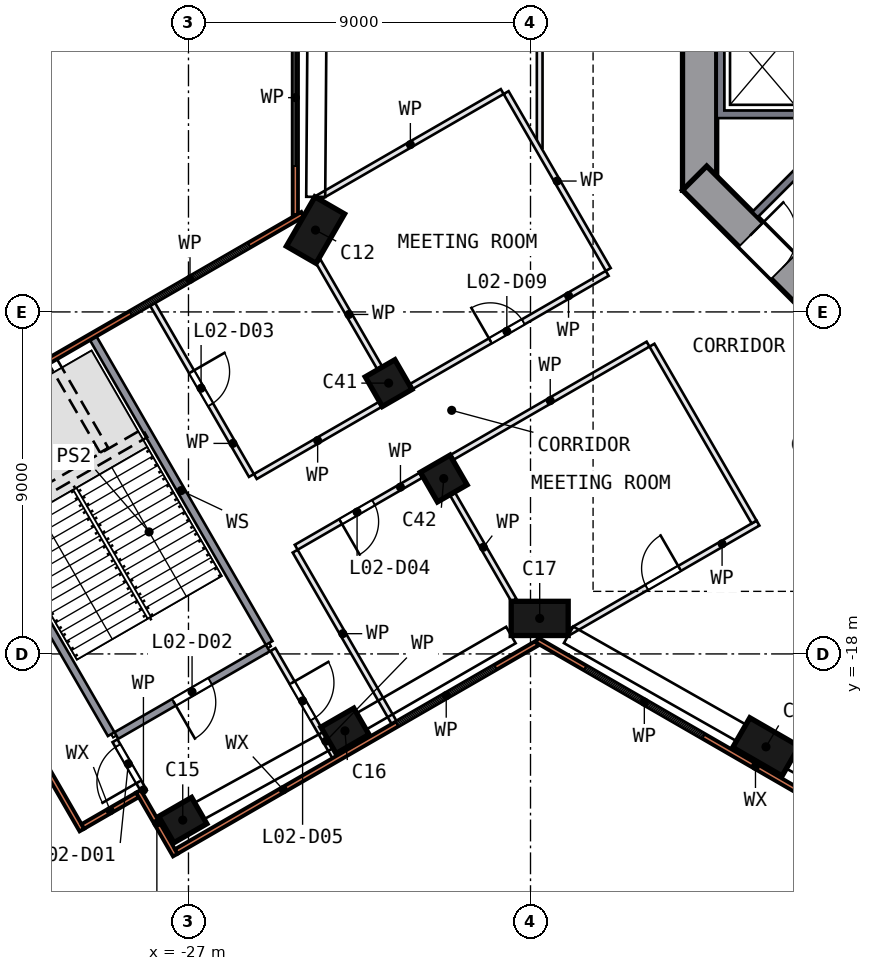
"""IFC4 building model, lengths in metres.
Left out: names, types, materials, properties, quantities, classifications, styles, units other than length and angle.
Written with IfcOpenShell. Run it as: python <this file> out.ifc"""

import sys

from ifc_helpers import new_model, si_unit, direction, frame, frame_2d, origin, origin_2d, place, context, subcontext, project, spatial, polyline, rectangle, outline, extrude, element, fill, save


model = new_model("IFC4")
c1 = context("Model", 3, precision=1e-05, world=origin(), true_north=direction((0.0, 1.0)))
c2 = subcontext(c1, "Body", "Model", "MODEL_VIEW")
j1 = project(units=[si_unit("LENGTHUNIT", "METRE"), si_unit("PLANEANGLEUNIT", "RADIAN")], contexts=[c1])
p1 = place(None, origin())
s1 = spatial("IfcSite", under=j1, at=p1, CompositionType="ELEMENT")
p2 = place(p1, origin())
s2 = spatial("IfcBuilding", under=s1, at=p2, CompositionType="ELEMENT")
p3 = place(p2, frame((0.0, 0.0, 14.0)))
s3 = spatial("IfcBuildingStorey", under=s2, at=p3, CompositionType="ELEMENT", Elevation=14.0)
p4 = place(p3, frame((-23.658, -6.846, 0.0), z_axis=(0.0, 0.0, 1.0), x_axis=(0.5, 0.866025404, 0.0)))
e1 = element("IfcColumn", 1, at=p4, inside=s3, PredefinedType="COLUMN", context=c2, shape_type="SweptSolid", body=[
    extrude(rectangle(XDim=1.5, YDim=0.9, at=origin_2d()), origin(), (0.0, 0.0, 1.0), 4.55),
])
for number, where, z_axis, x_axis in (
    (2, (-27.151, -22.373, 0.0), (0.0, 0.0, 1.0), (0.866, 0.5, 0.0)),
    (3, (-22.883, -20.024, 0.0), (0.0, 0.0, 1.0), (0.866, 0.5, 0.0)),
):
    element("IfcColumn", number, at=place(p3, frame(where, z_axis=z_axis, x_axis=x_axis)), inside=s3, PredefinedType="COLUMN", context=c2, shape_type="SweptSolid", body=[
        extrude(rectangle(XDim=1.0, YDim=0.8, at=origin_2d()), origin(), (0.0, 0.0, 1.0), 4.55),
    ])
for number, where, z_axis, x_axis in (
    (4, (-17.758, -17.065, 0.0), (0.0, 0.0, 1.0), (-1.0, 0.0, 0.0)),
    (5, (-11.804, -20.445, 0.0), (0.0, 0.0, 1.0), (0.866, -0.5, 0.0)),
):
    element("IfcColumn", number, at=place(p3, frame(where, z_axis=z_axis, x_axis=x_axis)), inside=s3, PredefinedType="COLUMN", context=c2, shape_type="SweptSolid", body=[
        extrude(rectangle(XDim=1.5, YDim=0.9, at=origin_2d()), origin(), (0.0, 0.0, 1.0), 4.55),
    ])
for number, where, z_axis, x_axis in (
    (6, (-21.733, -10.873, 0.0), (0.0, 0.0, 1.0), (-0.866, -0.5, 0.0)),
    (7, (-20.283, -13.385, 0.0), (0.0, 0.0, 1.0), (-0.866, -0.5, 0.0)),
):
    element("IfcColumn", number, at=place(p3, frame(where, z_axis=z_axis, x_axis=x_axis)), inside=s3, PredefinedType="COLUMN", context=c2, shape_type="SweptSolid", body=[
        extrude(rectangle(XDim=0.9, YDim=0.9, at=origin_2d()), origin(), (0.0, 0.0, 1.0), 4.55),
    ])
p5 = place(p3, frame((-13.55, 5.799, 0.0), z_axis=(0.0, 0.0, 1.0), x_axis=(0.0, -1.0, 0.0)))
e8 = element("IfcWall", 8, at=p5, inside=s3, PredefinedType="SHEAR", context=c2, shape_type="SweptSolid", body=[
    extrude(rectangle(XDim=11.598, YDim=0.9, at=frame_2d((5.799, 0.0))), origin(), (0.0, 0.0, 1.0), 5.0),
])
p6 = place(p5, frame((4.899, 0.0, 0.0)))
e9 = element("IfcOpeningElement", 9, at=p6, cuts=e8, PredefinedType="OPENING", context=c2, shape_type="SweptSolid", body=[
    extrude(rectangle(XDim=1.8, YDim=2.1, at=frame_2d((0.9, 1.05))), frame((0.0, 0.46, 0.0), z_axis=(0.0, -1.0, 0.0), x_axis=(1.0, 0.0, 0.0)), (0.0, 0.0, 1.0), 0.92),
])
p7 = place(p3, frame((-13.682, -5.481, 0.0), z_axis=(0.0, 0.0, 1.0), x_axis=(0.707106781, -0.707106781, 0.0)))
e10 = element("IfcWall", 10, at=p7, inside=s3, PredefinedType="SHEAR", context=c2, shape_type="SweptSolid", body=[
    extrude(rectangle(XDim=11.598, YDim=0.9, at=frame_2d((5.799, 0.0))), origin(), (0.0, 0.0, 1.0), 5.0),
])
p8 = place(p7, frame((2.099, 0.0, 0.0)))
e11 = element("IfcOpeningElement", 11, at=p8, cuts=e10, PredefinedType="OPENING", context=c2, shape_type="SweptSolid", body=[
    extrude(rectangle(XDim=1.2, YDim=2.1, at=frame_2d((0.6, 1.05))), frame((0.0, 0.46, 0.0), z_axis=(0.0, -1.0, 0.0), x_axis=(1.0, 0.0, 0.0)), (0.0, 0.0, 1.0), 0.92),
])
p9 = place(p3, frame((-24.188, 6.341, 0.0), z_axis=(0.0, 0.0, 1.0), x_axis=(0.0, -1.0, 0.0)))
e12 = element("IfcWall", 12, at=p9, inside=s3, PredefinedType="SOLIDWALL", context=c2, shape_type="SweptSolid", body=[
    extrude(rectangle(XDim=12.801, YDim=0.14, at=frame_2d((6.4, 0.0))), origin(), (0.0, 0.0, 1.0), 4.55),
])
p10 = place(p9, frame((1.748, 0.0, 0.9)))
e13 = element("IfcOpeningElement", 13, at=p10, cuts=e12, PredefinedType="OPENING", context=c2, shape_type="SweptSolid", body=[
    extrude(rectangle(XDim=3.0, YDim=2.7, at=frame_2d((1.5, 1.35))), frame((0.0, 0.08, 0.0), z_axis=(0.0, -1.0, 0.0), x_axis=(1.0, 0.0, 0.0)), (0.0, 0.0, 1.0), 0.16),
])
p11 = place(p9, frame((7.902, 0.0, 0.9)))
e14 = element("IfcOpeningElement", 14, at=p11, cuts=e12, PredefinedType="OPENING", context=c2, shape_type="SweptSolid", body=[
    extrude(rectangle(XDim=3.6, YDim=2.7, at=frame_2d((1.8, 1.35))), frame((0.0, 0.08, 0.0), z_axis=(0.0, -1.0, 0.0), x_axis=(1.0, 0.0, 0.0)), (0.0, 0.0, 1.0), 0.16),
])
p12 = place(p3, frame((-23.995, -6.429, 0.0), z_axis=(0.0, 0.0, 1.0), x_axis=(-0.866018753, -0.500011519, 0.0)))
e15 = element("IfcWall", 15, at=p12, inside=s3, PredefinedType="SOLIDWALL", context=c2, shape_type="SweptSolid", body=[
    extrude(rectangle(XDim=11.405, YDim=0.14, at=frame_2d((5.703, 0.0))), origin(), (0.0, 0.0, 1.0), 4.55),
])
p13 = place(p12, frame((1.623, 0.0, 0.9)))
e16 = element("IfcOpeningElement", 16, at=p13, cuts=e15, PredefinedType="OPENING", context=c2, shape_type="SweptSolid", body=[
    extrude(rectangle(XDim=3.6, YDim=2.7, at=frame_2d((1.8, 1.35))), frame((0.0, 0.08, 0.0), z_axis=(0.0, -1.0, 0.0), x_axis=(1.0, 0.0, 0.0)), (0.0, 0.0, 1.0), 0.16),
])
p14 = place(p3, frame((-30.775, -20.955, 0.0), z_axis=(0.0, 0.0, 1.0), x_axis=(0.499969368, -0.866043088, 0.0)))
e17 = element("IfcWall", 17, at=p14, inside=s3, PredefinedType="SOLIDWALL", context=c2, shape_type="SweptSolid", body=[
    extrude(rectangle(XDim=1.94, YDim=0.14, at=frame_2d((0.97, 0.0))), origin(), (0.0, 0.0, 1.0), 4.55),
])
p15 = place(p3, frame((-29.78, -22.54, 0.0), z_axis=(0.0, 0.0, 1.0), x_axis=(0.865989634, 0.500061949, 0.0)))
e18 = element("IfcWall", 18, at=p15, inside=s3, PredefinedType="SOLIDWALL", context=c2, shape_type="SweptSolid", body=[
    extrude(rectangle(XDim=1.66, YDim=0.14, at=frame_2d((0.83, 0.0))), origin(), (0.0, 0.0, 1.0), 4.55),
])
p16 = place(p3, frame((-28.317, -21.614, 0.0), z_axis=(0.0, 0.0, 1.0), x_axis=(0.499969368, -0.866043088, 0.0)))
e19 = element("IfcWall", 19, at=p16, inside=s3, PredefinedType="SOLIDWALL", context=c2, shape_type="SweptSolid", body=[
    extrude(rectangle(XDim=1.94, YDim=0.14, at=frame_2d((0.97, 0.0))), origin(), (0.0, 0.0, 1.0), 4.55),
])
p17 = place(p3, frame((-27.321, -23.198, 0.0), z_axis=(0.0, 0.0, 1.0), x_axis=(0.866030546, 0.499991093, 0.0)))
e20 = element("IfcWall", 20, at=p17, inside=s3, PredefinedType="SOLIDWALL", context=c2, shape_type="SweptSolid", body=[
    extrude(rectangle(XDim=10.961, YDim=0.14, at=frame_2d((5.48, 0.0))), origin(), (0.0, 0.0, 1.0), 4.55),
])
p18 = place(p17, frame((6.702, 0.0, 0.9)))
e21 = element("IfcOpeningElement", 21, at=p18, cuts=e20, PredefinedType="OPENING", context=c2, shape_type="SweptSolid", body=[
    extrude(rectangle(XDim=3.0, YDim=2.7, at=frame_2d((1.5, 1.35))), frame((0.0, 0.08, 0.0), z_axis=(0.0, -1.0, 0.0), x_axis=(1.0, 0.0, 0.0)), (0.0, 0.0, 1.0), 0.16),
])
p19 = place(p3, frame((-17.828, -17.637, 0.0), z_axis=(0.0, 0.0, 1.0), x_axis=(0.866029009, -0.499993756, 0.0)))
e22 = element("IfcWall", 22, at=p19, inside=s3, PredefinedType="SOLIDWALL", context=c2, shape_type="SweptSolid", body=[
    extrude(rectangle(XDim=13.242, YDim=0.14, at=frame_2d((6.621, 0.0))), origin(), (0.0, 0.0, 1.0), 4.55),
])
p20 = place(p19, frame((1.46, 0.0, 0.9)))
e23 = element("IfcOpeningElement", 23, at=p20, cuts=e22, PredefinedType="OPENING", context=c2, shape_type="SweptSolid", body=[
    extrude(rectangle(XDim=3.6, YDim=2.7, at=frame_2d((1.8, 1.35))), frame((0.0, 0.08, 0.0), z_axis=(0.0, -1.0, 0.0), x_axis=(1.0, 0.0, 0.0)), (0.0, 0.0, 1.0), 0.16),
])
p21 = place(p19, frame((8.215, 0.0, 0.9)))
e24 = element("IfcOpeningElement", 24, at=p21, cuts=e22, PredefinedType="OPENING", context=c2, shape_type="SweptSolid", body=[
    extrude(rectangle(XDim=3.0, YDim=2.7, at=frame_2d((1.5, 1.35))), frame((0.0, 0.08, 0.0), z_axis=(0.0, -1.0, 0.0), x_axis=(1.0, 0.0, 0.0)), (0.0, 0.0, 1.0), 0.16),
])
p22 = place(p3, origin())
e25 = element("IfcWall", 25, at=p22, inside=s3, PredefinedType="SOLIDWALL", context=c2, shape_type="SweptSolid", body=[
    extrude(outline(polyline([(-13.1, -3.9), (-13.1, -1.2), (-10.9, -1.2), (-10.9, -1.4), (-12.9, -1.4), (-12.9, -3.7), (-10.9, -3.7), (-10.9, -3.9), (-13.1, -3.9)])), origin(), (0.0, 0.0, 1.0), 4.55),
])
p23 = place(p3, frame((-9.334, -3.677, 0.0), z_axis=(0.0, 0.0, 1.0), x_axis=(-0.707106781, -0.707106781, 0.0)))
e26 = element("IfcWall", 26, at=p23, inside=s3, PredefinedType="SOLIDWALL", context=c2, shape_type="SweptSolid", body=[
    extrude(rectangle(XDim=3.9, YDim=0.2, at=frame_2d((1.95, 0.0))), origin(), (0.0, 0.0, 1.0), 4.55),
])
p24 = place(p3, frame((-32.807, -13.577, 0.0), z_axis=(0.0, 0.0, 1.0), x_axis=(0.50000534, -0.866022321, 0.0)))
e27 = element("IfcWall", 27, at=p24, inside=s3, PredefinedType="SOLIDWALL", context=c2, shape_type="SweptSolid", body=[
    extrude(rectangle(XDim=7.545, YDim=0.2, at=frame_2d((3.773, 0.0))), origin(), (0.0, 0.0, 1.0), 4.55),
])
p25 = place(p3, frame((-28.162, -21.623, 0.0), z_axis=(0.0, 0.0, 1.0), x_axis=(-0.499877454, 0.866096144, 0.0)))
e28 = element("IfcWall", 28, at=p25, inside=s3, PredefinedType="PARTITIONING", context=c2, shape_type="SweptSolid", body=[
    extrude(rectangle(XDim=1.545, YDim=0.15, at=frame_2d((0.773, 0.0))), origin(), (0.0, 0.0, 1.0), 4.55),
])
p26 = place(p25, frame((0.295, 0.0, 0.0)))
e29 = element("IfcOpeningElement", 29, at=p26, cuts=e28, PredefinedType="OPENING", context=c2, shape_type="SweptSolid", body=[
    extrude(rectangle(XDim=1.1, YDim=2.1, at=frame_2d((0.55, 1.05))), frame((0.0, 0.085, 0.0), z_axis=(0.0, -1.0, 0.0), x_axis=(1.0, 0.0, 0.0)), (0.0, 0.0, 1.0), 0.17),
])
p27 = place(p3, frame((-24.914, -17.848, 0.0), z_axis=(0.0, 0.0, 1.0), x_axis=(-0.86601677, -0.500014953, 0.0)))
e30 = element("IfcWall", 30, at=p27, inside=s3, PredefinedType="SOLIDWALL", context=c2, shape_type="SweptSolid", body=[
    extrude(rectangle(XDim=4.6, YDim=0.2, at=frame_2d((2.3, 0.0))), origin(), (0.0, 0.0, 1.0), 4.55),
])
p28 = place(p27, frame((1.75, 0.0, 0.0)))
e31 = element("IfcOpeningElement", 31, at=p28, cuts=e30, PredefinedType="OPENING", context=c2, shape_type="SweptSolid", body=[
    extrude(rectangle(XDim=1.1, YDim=2.1, at=frame_2d((0.55, 1.05))), frame((0.0, 0.11, 0.0), z_axis=(0.0, -1.0, 0.0), x_axis=(1.0, 0.0, 0.0)), (0.0, 0.0, 1.0), 0.22),
])
p29 = place(p3, frame((-27.948, -8.792, 0.0), z_axis=(0.0, 0.0, 1.0), x_axis=(0.499979347, -0.866037328, 0.0)))
e32 = element("IfcWall", 32, at=p29, inside=s3, PredefinedType="PARTITIONING", context=c2, shape_type="SweptSolid", body=[
    extrude(rectangle(XDim=5.21, YDim=0.15, at=frame_2d((2.605, 0.0))), origin(), (0.0, 0.0, 1.0), 4.55),
])
p30 = place(p29, frame((2.06, 0.0, 0.0)))
e33 = element("IfcOpeningElement", 33, at=p30, cuts=e32, PredefinedType="OPENING", context=c2, shape_type="SweptSolid", body=[
    extrude(rectangle(XDim=1.0, YDim=2.1, at=frame_2d((0.5, 1.05))), frame((0.0, 0.085, 0.0), z_axis=(0.0, -1.0, 0.0), x_axis=(1.0, 0.0, 0.0)), (0.0, 0.0, 1.0), 0.17),
])
p31 = place(p3, frame((-24.877, -17.712, 0.0), z_axis=(0.0, 0.0, 1.0), x_axis=(-0.499984148, 0.866034555, 0.0)))
e34 = element("IfcWall", 34, at=p31, inside=s3, PredefinedType="SOLIDWALL", context=c2, shape_type="SweptSolid", body=[
    extrude(rectangle(XDim=9.26, YDim=0.2, at=frame_2d((4.63, 0.0))), origin(), (0.0, 0.0, 1.0), 4.55),
])
p32 = place(p3, frame((-23.582, -7.675, 0.0), z_axis=(0.0, 0.0, 1.0), x_axis=(0.500027049, -0.866009787, 0.0)))
e35 = element("IfcWall", 35, at=p32, inside=s3, PredefinedType="PARTITIONING", context=c2, shape_type="SweptSolid", body=[
    extrude(rectangle(XDim=3.215, YDim=0.15, at=frame_2d((1.607, 0.0))), origin(), (0.0, 0.0, 1.0), 4.55),
])
p33 = place(p3, frame((-20.886, -13.3, 0.0), z_axis=(0.0, 0.0, 1.0), x_axis=(-0.866012734, -0.500021944, 0.0)))
e36 = element("IfcWall", 36, at=p33, inside=s3, PredefinedType="PARTITIONING", context=c2, shape_type="SweptSolid", body=[
    extrude(rectangle(XDim=3.787, YDim=0.15, at=frame_2d((1.894, 0.0))), origin(), (0.0, 0.0, 1.0), 4.55),
])
p34 = place(p33, frame((1.437, 0.0, 0.0)))
e37 = element("IfcOpeningElement", 37, at=p34, cuts=e36, PredefinedType="OPENING", context=c2, shape_type="SweptSolid", body=[
    extrude(rectangle(XDim=1.0, YDim=2.1, at=frame_2d((0.5, 1.05))), frame((0.0, 0.085, 0.0), z_axis=(0.0, -1.0, 0.0), x_axis=(1.0, 0.0, 0.0)), (0.0, 0.0, 1.0), 0.17),
])
p35 = place(p3, frame((-20.055, -12.82, 0.0), z_axis=(0.0, 0.0, 1.0), x_axis=(0.866038559, 0.499977214, 0.0)))
e38 = element("IfcWall", 38, at=p35, inside=s3, PredefinedType="PARTITIONING", context=c2, shape_type="SweptSolid", body=[
    extrude(rectangle(XDim=5.945, YDim=0.15, at=frame_2d((2.973, 0.0))), origin(), (0.0, 0.0, 1.0), 4.55),
])
p36 = place(p3, frame((-24.777, -17.885, 0.0), z_axis=(0.0, 0.0, 1.0), x_axis=(0.499996863, -0.866027215, 0.0)))
e39 = element("IfcWall", 39, at=p36, inside=s3, PredefinedType="PARTITIONING", context=c2, shape_type="SweptSolid", body=[
    extrude(rectangle(XDim=3.26, YDim=0.15, at=frame_2d((1.63, 0.0))), origin(), (0.0, 0.0, 1.0), 4.55),
])
p37 = place(p36, frame((1.01, 0.0, 0.0)))
e40 = element("IfcOpeningElement", 40, at=p37, cuts=e39, PredefinedType="OPENING", context=c2, shape_type="SweptSolid", body=[
    extrude(rectangle(XDim=1.1, YDim=2.1, at=frame_2d((0.55, 1.05))), frame((0.0, 0.085, 0.0), z_axis=(0.0, -1.0, 0.0), x_axis=(1.0, 0.0, 0.0)), (0.0, 0.0, 1.0), 0.17),
])
p38 = place(p3, frame((-21.588, -19.808, 0.0), z_axis=(0.0, 0.0, 1.0), x_axis=(-0.499999637, 0.866025613, 0.0)))
e41 = element("IfcWall", 41, at=p38, inside=s3, PredefinedType="PARTITIONING", context=c2, shape_type="SweptSolid", body=[
    extrude(rectangle(XDim=5.21, YDim=0.15, at=frame_2d((2.605, 0.0))), origin(), (0.0, 0.0, 1.0), 4.55),
])
p39 = place(p3, frame((-20.045, -13.802, 0.0), z_axis=(0.0, 0.0, 1.0), x_axis=(0.500027049, -0.866009787, 0.0)))
e42 = element("IfcWall", 42, at=p39, inside=s3, PredefinedType="PARTITIONING", context=c2, shape_type="SweptSolid", body=[
    extrude(rectangle(XDim=3.215, YDim=0.15, at=frame_2d((1.607, 0.0))), origin(), (0.0, 0.0, 1.0), 4.55),
])
p40 = place(p3, frame((-18.744, -3.201, 0.0), z_axis=(0.0, 0.0, 1.0), x_axis=(-0.866027538, -0.499996304, 0.0)))
e43 = element("IfcWall", 43, at=p40, inside=s3, PredefinedType="PARTITIONING", context=c2, shape_type="SweptSolid", body=[
    extrude(rectangle(XDim=5.582, YDim=0.15, at=frame_2d((2.791, 0.0))), origin(), (0.0, 0.0, 1.0), 4.55),
])
p41 = place(p3, frame((-17.758, -4.683, 0.0), z_axis=(0.0, 0.0, 1.0), x_axis=(0.0, 1.0, 0.0)))
e44 = element("IfcWall", 44, at=p41, inside=s3, PredefinedType="PARTITIONING", context=c2, shape_type="SweptSolid", body=[
    extrude(rectangle(XDim=9.367, YDim=0.15, at=frame_2d((4.683, 0.0))), origin(), (0.0, 0.0, 1.0), 4.55),
])
p42 = place(p41, frame((4.15, 0.0, 0.0)))
e45 = element("IfcOpeningElement", 45, at=p42, cuts=e44, PredefinedType="OPENING", context=c2, shape_type="SweptSolid", body=[
    extrude(rectangle(XDim=1.0, YDim=2.1, at=frame_2d((0.5, 1.05))), frame((0.0, 0.085, 0.0), z_axis=(0.0, -1.0, 0.0), x_axis=(1.0, 0.0, 0.0)), (0.0, 0.0, 1.0), 0.17),
])
p43 = place(p3, frame((-16.978, -17.424, 0.0), z_axis=(0.0, 0.0, 1.0), x_axis=(0.866011812, 0.500023541, 0.0)))
e46 = element("IfcWall", 46, at=p43, inside=s3, PredefinedType="PARTITIONING", context=c2, shape_type="SweptSolid", body=[
    extrude(rectangle(XDim=5.732, YDim=0.15, at=frame_2d((2.866, 0.0))), origin(), (0.0, 0.0, 1.0), 4.55),
])
p44 = place(p43, frame((2.35, 0.0, 0.0)))
e47 = element("IfcOpeningElement", 47, at=p44, cuts=e46, PredefinedType="OPENING", context=c2, shape_type="SweptSolid", body=[
    extrude(rectangle(XDim=1.0, YDim=2.1, at=frame_2d((0.5, 1.05))), frame((0.0, 0.085, 0.0), z_axis=(0.0, -1.0, 0.0), x_axis=(1.0, 0.0, 0.0)), (0.0, 0.0, 1.0), 0.17),
])
p45 = place(p3, frame((-21.961, -11.438, 0.0), z_axis=(0.0, 0.0, 1.0), x_axis=(-0.866040651, -0.499973591, 0.0)))
e48 = element("IfcWall", 48, at=p45, inside=s3, PredefinedType="PARTITIONING", context=c2, shape_type="SweptSolid", body=[
    extrude(rectangle(XDim=3.787, YDim=0.15, at=frame_2d((1.894, 0.0))), origin(), (0.0, 0.0, 1.0), 4.55),
])
p46 = place(p3, frame((-21.13, -10.958, 0.0), z_axis=(0.0, 0.0, 1.0), x_axis=(0.86601051, 0.500025795, 0.0)))
e49 = element("IfcWall", 49, at=p46, inside=s3, PredefinedType="PARTITIONING", context=c2, shape_type="SweptSolid", body=[
    extrude(rectangle(XDim=5.945, YDim=0.15, at=frame_2d((2.973, 0.0))), origin(), (0.0, 0.0, 1.0), 4.55),
])
p47 = place(p46, frame((2.395, 0.0, 0.0)))
e50 = element("IfcOpeningElement", 50, at=p47, cuts=e49, PredefinedType="OPENING", context=c2, shape_type="SweptSolid", body=[
    extrude(rectangle(XDim=1.0, YDim=2.1, at=frame_2d((0.5, 1.05))), frame((0.0, 0.085, 0.0), z_axis=(0.0, -1.0, 0.0), x_axis=(1.0, 0.0, 0.0)), (0.0, 0.0, 1.0), 0.17),
])
for number, where, z_axis, x_axis in (
    (51, (-15.954, -7.883, 0.0), (0.0, 0.0, 1.0), (-0.5, 0.866, 0.0)),
    (52, (-12.117, -14.53, 0.0), (0.0, 0.0, 1.0), (-0.5, 0.866, 0.0)),
):
    element("IfcWall", number, at=place(p3, frame(where, z_axis=z_axis, x_axis=x_axis)), inside=s3, PredefinedType="PARTITIONING", context=c2, shape_type="SweptSolid", body=[
        extrude(rectangle(XDim=5.375, YDim=0.15, at=frame_2d((2.688, 0.0))), origin(), (0.0, 0.0, 1.0), 4.55),
    ])
p48 = place(p11, origin())
e53 = element("IfcWindow", 53, at=p48, inside=s3, PartitioningType="SINGLE_PANEL", PredefinedType="WINDOW", context=c2, shape_type="SweptSolid", body=[
    extrude(rectangle(XDim=3.6, YDim=2.7, at=frame_2d((1.8, 1.35))), frame((0.0, 0.03, 0.0), z_axis=(0.0, -1.0, 0.0), x_axis=(1.0, 0.0, 0.0)), (0.0, 0.0, 1.0), 0.06),
])
fill(e14, e53)
p49 = place(p13, origin())
e54 = element("IfcWindow", 54, at=p49, inside=s3, PartitioningType="SINGLE_PANEL", PredefinedType="WINDOW", context=c2, shape_type="SweptSolid", body=[
    extrude(rectangle(XDim=3.6, YDim=2.7, at=frame_2d((1.8, 1.35))), frame((0.0, 0.03, 0.0), z_axis=(0.0, -1.0, 0.0), x_axis=(1.0, 0.0, 0.0)), (0.0, 0.0, 1.0), 0.06),
])
fill(e16, e54)
p50 = place(p18, origin())
e55 = element("IfcWindow", 55, at=p50, inside=s3, PartitioningType="SINGLE_PANEL", PredefinedType="WINDOW", context=c2, shape_type="SweptSolid", body=[
    extrude(rectangle(XDim=3.0, YDim=2.7, at=frame_2d((1.5, 1.35))), frame((0.0, 0.03, 0.0), z_axis=(0.0, -1.0, 0.0), x_axis=(1.0, 0.0, 0.0)), (0.0, 0.0, 1.0), 0.06),
])
fill(e21, e55)
p51 = place(p20, origin())
e56 = element("IfcWindow", 56, at=p51, inside=s3, PartitioningType="SINGLE_PANEL", PredefinedType="WINDOW", context=c2, shape_type="SweptSolid", body=[
    extrude(rectangle(XDim=3.6, YDim=2.7, at=frame_2d((1.8, 1.35))), frame((0.0, 0.03, 0.0), z_axis=(0.0, -1.0, 0.0), x_axis=(1.0, 0.0, 0.0)), (0.0, 0.0, 1.0), 0.06),
])
fill(e23, e56)
p52 = place(p8, origin())
e57 = element("IfcDoor", 57, at=p52, inside=s3, OperationType="SINGLE_SWING_LEFT", PredefinedType="DOOR", context=c2, shape_type="SweptSolid", body=[
    extrude(rectangle(XDim=1.2, YDim=2.1, at=frame_2d((0.6, 1.05))), frame((0.0, 0.025, 0.0), z_axis=(0.0, -1.0, 0.0), x_axis=(1.0, 0.0, 0.0)), (0.0, 0.0, 1.0), 0.05),
])
fill(e11, e57)
p53 = place(p26, origin())
e58 = element("IfcDoor", 58, at=p53, inside=s3, OperationType="SINGLE_SWING_LEFT", PredefinedType="DOOR", context=c2, shape_type="SweptSolid", body=[
    extrude(rectangle(XDim=1.1, YDim=2.1, at=frame_2d((0.55, 1.05))), frame((0.0, 0.025, 0.0), z_axis=(0.0, -1.0, 0.0), x_axis=(1.0, 0.0, 0.0)), (0.0, 0.0, 1.0), 0.05),
])
fill(e29, e58)
p54 = place(p28, origin())
e59 = element("IfcDoor", 59, at=p54, inside=s3, OperationType="SINGLE_SWING_RIGHT", PredefinedType="DOOR", context=c2, shape_type="SweptSolid", body=[
    extrude(rectangle(XDim=1.1, YDim=2.1, at=frame_2d((0.55, 1.05))), frame((0.0, 0.025, 0.0), z_axis=(0.0, -1.0, 0.0), x_axis=(1.0, 0.0, 0.0)), (0.0, 0.0, 1.0), 0.05),
])
fill(e31, e59)
p55 = place(p30, origin())
e60 = element("IfcDoor", 60, at=p55, inside=s3, OperationType="SINGLE_SWING_LEFT", PredefinedType="DOOR", context=c2, shape_type="SweptSolid", body=[
    extrude(rectangle(XDim=1.0, YDim=2.1, at=frame_2d((0.5, 1.05))), frame((0.0, 0.025, 0.0), z_axis=(0.0, -1.0, 0.0), x_axis=(1.0, 0.0, 0.0)), (0.0, 0.0, 1.0), 0.05),
])
fill(e33, e60)
p56 = place(p34, origin())
e61 = element("IfcDoor", 61, at=p56, inside=s3, OperationType="SINGLE_SWING_RIGHT", PredefinedType="DOOR", context=c2, shape_type="SweptSolid", body=[
    extrude(rectangle(XDim=1.0, YDim=2.1, at=frame_2d((0.5, 1.05))), frame((0.0, 0.025, 0.0), z_axis=(0.0, -1.0, 0.0), x_axis=(1.0, 0.0, 0.0)), (0.0, 0.0, 1.0), 0.05),
])
fill(e37, e61)
p57 = place(p37, origin())
e62 = element("IfcDoor", 62, at=p57, inside=s3, OperationType="SINGLE_SWING_LEFT", PredefinedType="DOOR", context=c2, shape_type="SweptSolid", body=[
    extrude(rectangle(XDim=1.1, YDim=2.1, at=frame_2d((0.55, 1.05))), frame((0.0, 0.025, 0.0), z_axis=(0.0, -1.0, 0.0), x_axis=(1.0, 0.0, 0.0)), (0.0, 0.0, 1.0), 0.05),
])
fill(e40, e62)
p58 = place(p44, origin())
e63 = element("IfcDoor", 63, at=p58, inside=s3, OperationType="SINGLE_SWING_RIGHT", PredefinedType="DOOR", context=c2, shape_type="SweptSolid", body=[
    extrude(rectangle(XDim=1.0, YDim=2.1, at=frame_2d((0.5, 1.05))), frame((0.0, 0.025, 0.0), z_axis=(0.0, -1.0, 0.0), x_axis=(1.0, 0.0, 0.0)), (0.0, 0.0, 1.0), 0.05),
])
fill(e47, e63)
p59 = place(p47, origin())
e64 = element("IfcDoor", 64, at=p59, inside=s3, OperationType="SINGLE_SWING_LEFT", PredefinedType="DOOR", context=c2, shape_type="SweptSolid", body=[
    extrude(rectangle(XDim=1.0, YDim=2.1, at=frame_2d((0.5, 1.05))), frame((0.0, 0.025, 0.0), z_axis=(0.0, -1.0, 0.0), x_axis=(1.0, 0.0, 0.0)), (0.0, 0.0, 1.0), 0.05),
])
fill(e50, e64)
save(model, sys.argv[1])
